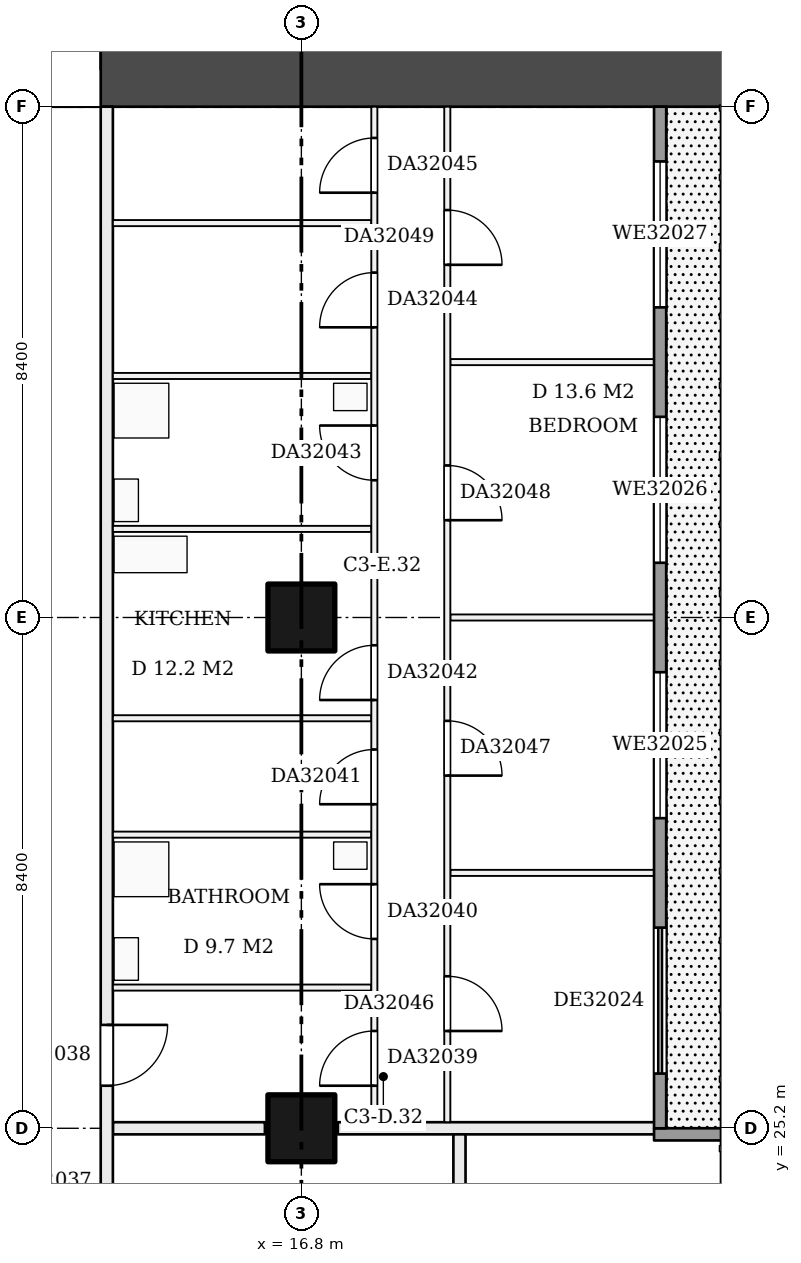
"""IFC4 building model, lengths in metres.
Left out: names, types, materials, properties, quantities, classifications, styles, units other than length and angle.
Written with IfcOpenShell. Run it as: python <this file> out.ifc"""

import sys

from ifc_helpers import new_model, si_unit, direction, frame, frame_2d, origin, origin_2d, place, context, subcontext, project, spatial, rectangle, extrude, element, fill, save


model = new_model("IFC4")
c1 = context("Model", 3, precision=1e-05, world=origin(), true_north=direction((0.0, 1.0)))
c2 = subcontext(c1, "Body", "Model", "MODEL_VIEW")
j1 = project(units=[si_unit("LENGTHUNIT", "METRE"), si_unit("PLANEANGLEUNIT", "RADIAN")], contexts=[c1])
p1 = place(None, origin())
s1 = spatial("IfcSite", under=j1, at=p1, CompositionType="ELEMENT")
p2 = place(p1, origin())
s2 = spatial("IfcBuilding", under=s1, at=p2, CompositionType="ELEMENT")
p3 = place(p2, frame((0.0, 0.0, 126.7)))
s3 = spatial("IfcBuildingStorey", under=s2, at=p3, CompositionType="ELEMENT", Elevation=126.7)
for number, where, z_axis, x_axis in (
    (1, (16.8, 25.2, 0.0), (0.0, 0.0, 1.0), (1.0, 0.0, 0.0)),
    (2, (16.8, 33.6, 0.0), (0.0, 0.0, 1.0), (1.0, 0.0, 0.0)),
):
    element("IfcColumn", number, at=place(p3, frame(where, z_axis=z_axis, x_axis=x_axis)), inside=s3, PredefinedType="COLUMN", context=c2, shape_type="SweptSolid", body=[
        extrude(rectangle(XDim=1.1, YDim=1.1, at=origin_2d()), origin(), (0.0, 0.0, 1.0), 3.22),
    ])
p4 = place(p3, frame((9.6, 42.6, 0.0), z_axis=(0.0, 0.0, 1.0), x_axis=(1.0, 0.0, 0.0)))
e3 = element("IfcWall", 3, at=p4, inside=s3, PredefinedType="SHEAR", context=c2, shape_type="SweptSolid", body=[
    extrude(rectangle(XDim=14.4, YDim=1.2, at=frame_2d((7.2, 0.0))), origin(), (0.0, 0.0, 1.0), 3.22),
])
p5 = place(p4, frame((2.1, 0.0, 0.0)))
e4 = element("IfcOpeningElement", 4, at=p5, cuts=e3, PredefinedType="OPENING", context=c2, shape_type="SweptSolid", body=[
    extrude(rectangle(XDim=1.8, YDim=2.1, at=frame_2d((0.9, 1.05))), frame((0.0, 0.61, 0.0), z_axis=(0.0, -1.0, 0.0), x_axis=(1.0, 0.0, 0.0)), (0.0, 0.0, 1.0), 1.22),
])
p6 = place(p3, frame((13.7, 25.2, 0.0), z_axis=(0.0, 0.0, 1.0), x_axis=(1.0, 0.0, 0.0)))
e5 = element("IfcWall", 5, at=p6, inside=s3, PredefinedType="PARTITIONING", context=c2, shape_type="SweptSolid", body=[
    extrude(rectangle(XDim=2.5, YDim=0.2, at=frame_2d((1.25, 0.0))), origin(), (0.0, 0.0, 1.0), 3.22),
])
p7 = place(p3, frame((17.4, 25.2, 0.0), z_axis=(0.0, 0.0, 1.0), x_axis=(1.0, 0.0, 0.0)))
e6 = element("IfcWall", 6, at=p7, inside=s3, PredefinedType="PARTITIONING", context=c2, shape_type="SweptSolid", body=[
    extrude(rectangle(XDim=5.3, YDim=0.2, at=frame_2d((2.65, 0.0))), origin(), (0.0, 0.0, 1.0), 3.22),
])
p8 = place(p3, frame((13.7, 27.514, 0.0), z_axis=(0.0, 0.0, 1.0), x_axis=(1.0, 0.0, 0.0)))
e7 = element("IfcWall", 7, at=p8, inside=s3, PredefinedType="PARTITIONING", context=c2, shape_type="SweptSolid", body=[
    extrude(rectangle(XDim=4.25, YDim=0.1, at=frame_2d((2.125, 0.0))), origin(), (0.0, 0.0, 1.0), 3.22),
])
p9 = place(p3, frame((19.25, 29.4, 0.0), z_axis=(0.0, 0.0, 1.0), x_axis=(1.0, 0.0, 0.0)))
e8 = element("IfcWall", 8, at=p9, inside=s3, PredefinedType="PARTITIONING", context=c2, shape_type="SweptSolid", body=[
    extrude(rectangle(XDim=3.45, YDim=0.1, at=frame_2d((1.725, 0.0))), origin(), (0.0, 0.0, 1.0), 3.22),
])
for number, where, z_axis, x_axis in (
    (9, (13.7, 30.029, 0.0), (0.0, 0.0, 1.0), (1.0, 0.0, 0.0)),
    (10, (13.7, 31.943, 0.0), (0.0, 0.0, 1.0), (1.0, 0.0, 0.0)),
):
    element("IfcWall", number, at=place(p3, frame(where, z_axis=z_axis, x_axis=x_axis)), inside=s3, PredefinedType="PARTITIONING", context=c2, shape_type="SweptSolid", body=[
        extrude(rectangle(XDim=4.25, YDim=0.1, at=frame_2d((2.125, 0.0))), origin(), (0.0, 0.0, 1.0), 3.22),
    ])
p10 = place(p3, frame((19.25, 33.6, 0.0), z_axis=(0.0, 0.0, 1.0), x_axis=(1.0, 0.0, 0.0)))
e11 = element("IfcWall", 11, at=p10, inside=s3, PredefinedType="PARTITIONING", context=c2, shape_type="SweptSolid", body=[
    extrude(rectangle(XDim=3.45, YDim=0.1, at=frame_2d((1.725, 0.0))), origin(), (0.0, 0.0, 1.0), 3.22),
])
for number, where, z_axis, x_axis in (
    (12, (13.7, 35.057, 0.0), (0.0, 0.0, 1.0), (1.0, 0.0, 0.0)),
    (13, (13.7, 37.572, 0.0), (0.0, 0.0, 1.0), (1.0, 0.0, 0.0)),
):
    element("IfcWall", number, at=place(p3, frame(where, z_axis=z_axis, x_axis=x_axis)), inside=s3, PredefinedType="PARTITIONING", context=c2, shape_type="SweptSolid", body=[
        extrude(rectangle(XDim=4.25, YDim=0.1, at=frame_2d((2.125, 0.0))), origin(), (0.0, 0.0, 1.0), 3.22),
    ])
p11 = place(p3, frame((19.25, 37.8, 0.0), z_axis=(0.0, 0.0, 1.0), x_axis=(1.0, 0.0, 0.0)))
e14 = element("IfcWall", 14, at=p11, inside=s3, PredefinedType="PARTITIONING", context=c2, shape_type="SweptSolid", body=[
    extrude(rectangle(XDim=3.45, YDim=0.1, at=frame_2d((1.725, 0.0))), origin(), (0.0, 0.0, 1.0), 3.22),
])
p12 = place(p3, frame((13.7, 40.086, 0.0), z_axis=(0.0, 0.0, 1.0), x_axis=(1.0, 0.0, 0.0)))
e15 = element("IfcWall", 15, at=p12, inside=s3, PredefinedType="PARTITIONING", context=c2, shape_type="SweptSolid", body=[
    extrude(rectangle(XDim=4.25, YDim=0.1, at=frame_2d((2.125, 0.0))), origin(), (0.0, 0.0, 1.0), 3.22),
])
p13 = place(p3, frame((13.6, 23.0, 0.0), z_axis=(0.0, 0.0, 1.0), x_axis=(0.0, 1.0, 0.0)))
e16 = element("IfcWall", 16, at=p13, inside=s3, PredefinedType="PARTITIONING", context=c2, shape_type="SweptSolid", body=[
    extrude(rectangle(XDim=19.0, YDim=0.2, at=frame_2d((9.5, 0.0))), origin(), (0.0, 0.0, 1.0), 3.22),
])
p14 = place(p13, frame((2.9, 0.0, 0.0)))
e17 = element("IfcOpeningElement", 17, at=p14, cuts=e16, PredefinedType="OPENING", context=c2, shape_type="SweptSolid", body=[
    extrude(rectangle(XDim=1.0, YDim=2.1, at=frame_2d((0.5, 1.05))), frame((0.0, 0.11, 0.0), z_axis=(0.0, -1.0, 0.0), x_axis=(1.0, 0.0, 0.0)), (0.0, 0.0, 1.0), 0.22),
])
p15 = place(p3, frame((18.0, 25.3, 0.0), z_axis=(0.0, 0.0, 1.0), x_axis=(0.0, 1.0, 0.0)))
e18 = element("IfcWall", 18, at=p15, inside=s3, PredefinedType="PARTITIONING", context=c2, shape_type="SweptSolid", body=[
    extrude(rectangle(XDim=16.7, YDim=0.1, at=frame_2d((8.35, 0.0))), origin(), (0.0, 0.0, 1.0), 3.22),
])
p16 = place(p15, frame((0.6, 0.0, 0.0)))
e19 = element("IfcOpeningElement", 19, at=p16, cuts=e18, PredefinedType="OPENING", context=c2, shape_type="SweptSolid", body=[
    extrude(rectangle(XDim=0.9, YDim=2.1, at=frame_2d((0.45, 1.05))), frame((0.0, 0.06, 0.0), z_axis=(0.0, -1.0, 0.0), x_axis=(1.0, 0.0, 0.0)), (0.0, 0.0, 1.0), 0.12),
])
p17 = place(p15, frame((3.014, 0.0, 0.0)))
e20 = element("IfcOpeningElement", 20, at=p17, cuts=e18, PredefinedType="OPENING", context=c2, shape_type="SweptSolid", body=[
    extrude(rectangle(XDim=0.9, YDim=2.1, at=frame_2d((0.45, 1.05))), frame((0.0, 0.06, 0.0), z_axis=(0.0, -1.0, 0.0), x_axis=(1.0, 0.0, 0.0)), (0.0, 0.0, 1.0), 0.12),
])
p18 = place(p15, frame((5.229, 0.0, 0.0)))
e21 = element("IfcOpeningElement", 21, at=p18, cuts=e18, PredefinedType="OPENING", context=c2, shape_type="SweptSolid", body=[
    extrude(rectangle(XDim=0.9, YDim=2.1, at=frame_2d((0.45, 1.05))), frame((0.0, 0.06, 0.0), z_axis=(0.0, -1.0, 0.0), x_axis=(1.0, 0.0, 0.0)), (0.0, 0.0, 1.0), 0.12),
])
p19 = place(p15, frame((6.943, 0.0, 0.0)))
e22 = element("IfcOpeningElement", 22, at=p19, cuts=e18, PredefinedType="OPENING", context=c2, shape_type="SweptSolid", body=[
    extrude(rectangle(XDim=0.9, YDim=2.1, at=frame_2d((0.45, 1.05))), frame((0.0, 0.06, 0.0), z_axis=(0.0, -1.0, 0.0), x_axis=(1.0, 0.0, 0.0)), (0.0, 0.0, 1.0), 0.12),
])
p20 = place(p15, frame((10.557, 0.0, 0.0)))
e23 = element("IfcOpeningElement", 23, at=p20, cuts=e18, PredefinedType="OPENING", context=c2, shape_type="SweptSolid", body=[
    extrude(rectangle(XDim=0.9, YDim=2.1, at=frame_2d((0.45, 1.05))), frame((0.0, 0.06, 0.0), z_axis=(0.0, -1.0, 0.0), x_axis=(1.0, 0.0, 0.0)), (0.0, 0.0, 1.0), 0.12),
])
p21 = place(p15, frame((13.072, 0.0, 0.0)))
e24 = element("IfcOpeningElement", 24, at=p21, cuts=e18, PredefinedType="OPENING", context=c2, shape_type="SweptSolid", body=[
    extrude(rectangle(XDim=0.9, YDim=2.1, at=frame_2d((0.45, 1.05))), frame((0.0, 0.06, 0.0), z_axis=(0.0, -1.0, 0.0), x_axis=(1.0, 0.0, 0.0)), (0.0, 0.0, 1.0), 0.12),
])
p22 = place(p15, frame((15.286, 0.0, 0.0)))
e25 = element("IfcOpeningElement", 25, at=p22, cuts=e18, PredefinedType="OPENING", context=c2, shape_type="SweptSolid", body=[
    extrude(rectangle(XDim=0.9, YDim=2.1, at=frame_2d((0.45, 1.05))), frame((0.0, 0.06, 0.0), z_axis=(0.0, -1.0, 0.0), x_axis=(1.0, 0.0, 0.0)), (0.0, 0.0, 1.0), 0.12),
])
p23 = place(p3, frame((19.2, 25.3, 0.0), z_axis=(0.0, 0.0, 1.0), x_axis=(0.0, 1.0, 0.0)))
e26 = element("IfcWall", 26, at=p23, inside=s3, PredefinedType="PARTITIONING", context=c2, shape_type="SweptSolid", body=[
    extrude(rectangle(XDim=16.7, YDim=0.1, at=frame_2d((8.35, 0.0))), origin(), (0.0, 0.0, 1.0), 3.22),
])
p24 = place(p23, frame((1.5, 0.0, 0.0)))
e27 = element("IfcOpeningElement", 27, at=p24, cuts=e26, PredefinedType="OPENING", context=c2, shape_type="SweptSolid", body=[
    extrude(rectangle(XDim=0.9, YDim=2.1, at=frame_2d((0.45, 1.05))), frame((0.0, 0.06, 0.0), z_axis=(0.0, -1.0, 0.0), x_axis=(1.0, 0.0, 0.0)), (0.0, 0.0, 1.0), 0.12),
])
p25 = place(p23, frame((5.7, 0.0, 0.0)))
e28 = element("IfcOpeningElement", 28, at=p25, cuts=e26, PredefinedType="OPENING", context=c2, shape_type="SweptSolid", body=[
    extrude(rectangle(XDim=0.9, YDim=2.1, at=frame_2d((0.45, 1.05))), frame((0.0, 0.06, 0.0), z_axis=(0.0, -1.0, 0.0), x_axis=(1.0, 0.0, 0.0)), (0.0, 0.0, 1.0), 0.12),
])
p26 = place(p23, frame((9.9, 0.0, 0.0)))
e29 = element("IfcOpeningElement", 29, at=p26, cuts=e26, PredefinedType="OPENING", context=c2, shape_type="SweptSolid", body=[
    extrude(rectangle(XDim=0.9, YDim=2.1, at=frame_2d((0.45, 1.05))), frame((0.0, 0.06, 0.0), z_axis=(0.0, -1.0, 0.0), x_axis=(1.0, 0.0, 0.0)), (0.0, 0.0, 1.0), 0.12),
])
p27 = place(p23, frame((14.1, 0.0, 0.0)))
e30 = element("IfcOpeningElement", 30, at=p27, cuts=e26, PredefinedType="OPENING", context=c2, shape_type="SweptSolid", body=[
    extrude(rectangle(XDim=0.9, YDim=2.1, at=frame_2d((0.45, 1.05))), frame((0.0, 0.06, 0.0), z_axis=(0.0, -1.0, 0.0), x_axis=(1.0, 0.0, 0.0)), (0.0, 0.0, 1.0), 0.12),
])
p28 = place(p3, frame((19.4, 23.0, 0.0), z_axis=(0.0, 0.0, 1.0), x_axis=(0.0, 1.0, 0.0)))
e31 = element("IfcWall", 31, at=p28, inside=s3, PredefinedType="PARTITIONING", context=c2, shape_type="SweptSolid", body=[
    extrude(rectangle(XDim=2.1, YDim=0.2, at=frame_2d((1.05, 0.0))), origin(), (0.0, 0.0, 1.0), 3.22),
])
p29 = place(p3, frame((24.6, 25.1, 0.0), z_axis=(0.0, 0.0, 1.0), x_axis=(-1.0, 0.0, 0.0)))
e32 = element("IfcWall", 32, at=p29, inside=s3, PredefinedType="SOLIDWALL", context=c2, shape_type="SweptSolid", body=[
    extrude(rectangle(XDim=2.0, YDim=0.2, at=frame_2d((1.0, 0.0))), origin(), (0.0, 0.0, 1.0), 3.22),
])
p30 = place(p3, frame((22.7, 25.2, 0.0), z_axis=(0.0, 0.0, 1.0), x_axis=(0.0, 1.0, 0.0)))
e33 = element("IfcWall", 33, at=p30, inside=s3, PredefinedType="SOLIDWALL", context=c2, shape_type="SweptSolid", body=[
    extrude(rectangle(XDim=16.8, YDim=0.2, at=frame_2d((8.4, 0.0))), origin(), (0.0, 0.0, 1.0), 3.22),
])
p31 = place(p30, frame((0.9, 0.0, 0.0)))
e34 = element("IfcOpeningElement", 34, at=p31, cuts=e33, PredefinedType="OPENING", context=c2, shape_type="SweptSolid", body=[
    extrude(rectangle(XDim=2.4, YDim=2.2, at=frame_2d((1.2, 1.1))), frame((0.0, 0.11, 0.0), z_axis=(0.0, -1.0, 0.0), x_axis=(1.0, 0.0, 0.0)), (0.0, 0.0, 1.0), 0.22),
])
p32 = place(p30, frame((5.1, 0.0, 0.9)))
e35 = element("IfcOpeningElement", 35, at=p32, cuts=e33, PredefinedType="OPENING", context=c2, shape_type="SweptSolid", body=[
    extrude(rectangle(XDim=2.4, YDim=1.5, at=frame_2d((1.2, 0.75))), frame((0.0, 0.11, 0.0), z_axis=(0.0, -1.0, 0.0), x_axis=(1.0, 0.0, 0.0)), (0.0, 0.0, 1.0), 0.22),
])
p33 = place(p30, frame((9.3, 0.0, 0.9)))
e36 = element("IfcOpeningElement", 36, at=p33, cuts=e33, PredefinedType="OPENING", context=c2, shape_type="SweptSolid", body=[
    extrude(rectangle(XDim=2.4, YDim=1.5, at=frame_2d((1.2, 0.75))), frame((0.0, 0.11, 0.0), z_axis=(0.0, -1.0, 0.0), x_axis=(1.0, 0.0, 0.0)), (0.0, 0.0, 1.0), 0.22),
])
p34 = place(p30, frame((13.5, 0.0, 0.9)))
e37 = element("IfcOpeningElement", 37, at=p34, cuts=e33, PredefinedType="OPENING", context=c2, shape_type="SweptSolid", body=[
    extrude(rectangle(XDim=2.4, YDim=1.5, at=frame_2d((1.2, 0.75))), frame((0.0, 0.11, 0.0), z_axis=(0.0, -1.0, 0.0), x_axis=(1.0, 0.0, 0.0)), (0.0, 0.0, 1.0), 0.22),
])
p35 = place(p5, origin())
e38 = element("IfcDoor", 38, at=p35, inside=s3, OperationType="DOUBLE_DOOR_SINGLE_SWING", PredefinedType="DOOR", context=c2, shape_type="SweptSolid", body=[
    extrude(rectangle(XDim=1.8, YDim=2.1, at=frame_2d((0.9, 1.05))), frame((0.0, 0.025, 0.0), z_axis=(0.0, -1.0, 0.0), x_axis=(1.0, 0.0, 0.0)), (0.0, 0.0, 1.0), 0.05),
])
fill(e4, e38)
p36 = place(p14, frame((1.0, 0.0, 0.0), z_axis=(0.0, 0.0, 1.0), x_axis=(-1.0, 0.0, 0.0)))
e39 = element("IfcDoor", 39, at=p36, inside=s3, OperationType="SINGLE_SWING_LEFT", PredefinedType="DOOR", context=c2, shape_type="SweptSolid", body=[
    extrude(rectangle(XDim=1.0, YDim=2.1, at=frame_2d((0.5, 1.05))), frame((0.0, 0.025, 0.0), z_axis=(0.0, -1.0, 0.0), x_axis=(1.0, 0.0, 0.0)), (0.0, 0.0, 1.0), 0.05),
])
fill(e17, e39)
p37 = place(p16, origin())
e40 = element("IfcDoor", 40, at=p37, inside=s3, OperationType="SINGLE_SWING_LEFT", PredefinedType="DOOR", context=c2, shape_type="SweptSolid", body=[
    extrude(rectangle(XDim=0.9, YDim=2.1, at=frame_2d((0.45, 1.05))), frame((0.0, 0.025, 0.0), z_axis=(0.0, -1.0, 0.0), x_axis=(1.0, 0.0, 0.0)), (0.0, 0.0, 1.0), 0.05),
])
fill(e19, e40)
p38 = place(p17, origin())
e41 = element("IfcDoor", 41, at=p38, inside=s3, OperationType="SINGLE_SWING_RIGHT", PredefinedType="DOOR", context=c2, shape_type="SweptSolid", body=[
    extrude(rectangle(XDim=0.9, YDim=2.1, at=frame_2d((0.45, 1.05))), frame((0.0, 0.025, 0.0), z_axis=(0.0, -1.0, 0.0), x_axis=(1.0, 0.0, 0.0)), (0.0, 0.0, 1.0), 0.05),
])
fill(e20, e41)
p39 = place(p18, origin())
e42 = element("IfcDoor", 42, at=p39, inside=s3, OperationType="SINGLE_SWING_LEFT", PredefinedType="DOOR", context=c2, shape_type="SweptSolid", body=[
    extrude(rectangle(XDim=0.9, YDim=2.1, at=frame_2d((0.45, 1.05))), frame((0.0, 0.025, 0.0), z_axis=(0.0, -1.0, 0.0), x_axis=(1.0, 0.0, 0.0)), (0.0, 0.0, 1.0), 0.05),
])
fill(e21, e42)
p40 = place(p19, origin())
e43 = element("IfcDoor", 43, at=p40, inside=s3, OperationType="SINGLE_SWING_LEFT", PredefinedType="DOOR", context=c2, shape_type="SweptSolid", body=[
    extrude(rectangle(XDim=0.9, YDim=2.1, at=frame_2d((0.45, 1.05))), frame((0.0, 0.025, 0.0), z_axis=(0.0, -1.0, 0.0), x_axis=(1.0, 0.0, 0.0)), (0.0, 0.0, 1.0), 0.05),
])
fill(e22, e43)
p41 = place(p20, origin())
e44 = element("IfcDoor", 44, at=p41, inside=s3, OperationType="SINGLE_SWING_RIGHT", PredefinedType="DOOR", context=c2, shape_type="SweptSolid", body=[
    extrude(rectangle(XDim=0.9, YDim=2.1, at=frame_2d((0.45, 1.05))), frame((0.0, 0.025, 0.0), z_axis=(0.0, -1.0, 0.0), x_axis=(1.0, 0.0, 0.0)), (0.0, 0.0, 1.0), 0.05),
])
fill(e23, e44)
p42 = place(p21, origin())
e45 = element("IfcDoor", 45, at=p42, inside=s3, OperationType="SINGLE_SWING_LEFT", PredefinedType="DOOR", context=c2, shape_type="SweptSolid", body=[
    extrude(rectangle(XDim=0.9, YDim=2.1, at=frame_2d((0.45, 1.05))), frame((0.0, 0.025, 0.0), z_axis=(0.0, -1.0, 0.0), x_axis=(1.0, 0.0, 0.0)), (0.0, 0.0, 1.0), 0.05),
])
fill(e24, e45)
p43 = place(p22, origin())
e46 = element("IfcDoor", 46, at=p43, inside=s3, OperationType="SINGLE_SWING_LEFT", PredefinedType="DOOR", context=c2, shape_type="SweptSolid", body=[
    extrude(rectangle(XDim=0.9, YDim=2.1, at=frame_2d((0.45, 1.05))), frame((0.0, 0.025, 0.0), z_axis=(0.0, -1.0, 0.0), x_axis=(1.0, 0.0, 0.0)), (0.0, 0.0, 1.0), 0.05),
])
fill(e25, e46)
p44 = place(p24, frame((0.9, 0.0, 0.0), z_axis=(0.0, 0.0, 1.0), x_axis=(-1.0, 0.0, 0.0)))
e47 = element("IfcDoor", 47, at=p44, inside=s3, OperationType="SINGLE_SWING_RIGHT", PredefinedType="DOOR", context=c2, shape_type="SweptSolid", body=[
    extrude(rectangle(XDim=0.9, YDim=2.1, at=frame_2d((0.45, 1.05))), frame((0.0, 0.025, 0.0), z_axis=(0.0, -1.0, 0.0), x_axis=(1.0, 0.0, 0.0)), (0.0, 0.0, 1.0), 0.05),
])
fill(e27, e47)
p45 = place(p25, frame((0.9, 0.0, 0.0), z_axis=(0.0, 0.0, 1.0), x_axis=(-1.0, 0.0, 0.0)))
e48 = element("IfcDoor", 48, at=p45, inside=s3, OperationType="SINGLE_SWING_RIGHT", PredefinedType="DOOR", context=c2, shape_type="SweptSolid", body=[
    extrude(rectangle(XDim=0.9, YDim=2.1, at=frame_2d((0.45, 1.05))), frame((0.0, 0.025, 0.0), z_axis=(0.0, -1.0, 0.0), x_axis=(1.0, 0.0, 0.0)), (0.0, 0.0, 1.0), 0.05),
])
fill(e28, e48)
p46 = place(p26, frame((0.9, 0.0, 0.0), z_axis=(0.0, 0.0, 1.0), x_axis=(-1.0, 0.0, 0.0)))
e49 = element("IfcDoor", 49, at=p46, inside=s3, OperationType="SINGLE_SWING_RIGHT", PredefinedType="DOOR", context=c2, shape_type="SweptSolid", body=[
    extrude(rectangle(XDim=0.9, YDim=2.1, at=frame_2d((0.45, 1.05))), frame((0.0, 0.025, 0.0), z_axis=(0.0, -1.0, 0.0), x_axis=(1.0, 0.0, 0.0)), (0.0, 0.0, 1.0), 0.05),
])
fill(e29, e49)
p47 = place(p27, frame((0.9, 0.0, 0.0), z_axis=(0.0, 0.0, 1.0), x_axis=(-1.0, 0.0, 0.0)))
e50 = element("IfcDoor", 50, at=p47, inside=s3, OperationType="SINGLE_SWING_RIGHT", PredefinedType="DOOR", context=c2, shape_type="SweptSolid", body=[
    extrude(rectangle(XDim=0.9, YDim=2.1, at=frame_2d((0.45, 1.05))), frame((0.0, 0.025, 0.0), z_axis=(0.0, -1.0, 0.0), x_axis=(1.0, 0.0, 0.0)), (0.0, 0.0, 1.0), 0.05),
])
fill(e30, e50)
p48 = place(p31, origin())
e51 = element("IfcDoor", 51, at=p48, inside=s3, OperationType="DOUBLE_DOOR_SLIDING", PredefinedType="DOOR", context=c2, shape_type="SweptSolid", body=[
    extrude(rectangle(XDim=2.4, YDim=2.2, at=frame_2d((1.2, 1.1))), frame((0.0, 0.025, 0.0), z_axis=(0.0, -1.0, 0.0), x_axis=(1.0, 0.0, 0.0)), (0.0, 0.0, 1.0), 0.05),
])
fill(e34, e51)
p49 = place(p32, origin())
e52 = element("IfcWindow", 52, at=p49, inside=s3, PartitioningType="SINGLE_PANEL", PredefinedType="WINDOW", context=c2, shape_type="SweptSolid", body=[
    extrude(rectangle(XDim=2.4, YDim=1.5, at=frame_2d((1.2, 0.75))), frame((0.0, 0.03, 0.0), z_axis=(0.0, -1.0, 0.0), x_axis=(1.0, 0.0, 0.0)), (0.0, 0.0, 1.0), 0.06),
])
fill(e35, e52)
p50 = place(p33, origin())
e53 = element("IfcWindow", 53, at=p50, inside=s3, PartitioningType="SINGLE_PANEL", PredefinedType="WINDOW", context=c2, shape_type="SweptSolid", body=[
    extrude(rectangle(XDim=2.4, YDim=1.5, at=frame_2d((1.2, 0.75))), frame((0.0, 0.03, 0.0), z_axis=(0.0, -1.0, 0.0), x_axis=(1.0, 0.0, 0.0)), (0.0, 0.0, 1.0), 0.06),
])
fill(e36, e53)
p51 = place(p34, origin())
e54 = element("IfcWindow", 54, at=p51, inside=s3, PartitioningType="SINGLE_PANEL", PredefinedType="WINDOW", context=c2, shape_type="SweptSolid", body=[
    extrude(rectangle(XDim=2.4, YDim=1.5, at=frame_2d((1.2, 0.75))), frame((0.0, 0.03, 0.0), z_axis=(0.0, -1.0, 0.0), x_axis=(1.0, 0.0, 0.0)), (0.0, 0.0, 1.0), 0.06),
])
fill(e37, e54)
save(model, sys.argv[1])
